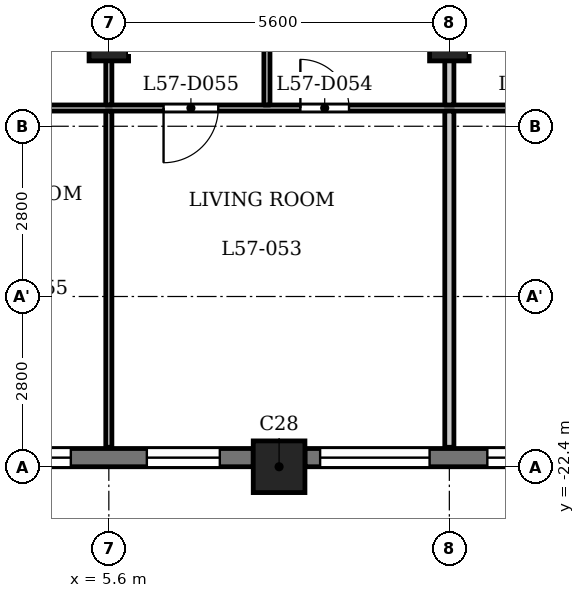
"""IFC4 building model, lengths in metres.
Left out: names, types, materials, properties, quantities, classifications, styles, units other than length and angle.
Written with IfcOpenShell. Run it as: python <this file> out.ifc"""

import sys

from ifc_helpers import new_model, si_unit, direction, frame, frame_2d, origin, origin_2d, place, context, subcontext, project, spatial, rectangle, extrude, element, fill, save


model = new_model("IFC4")
c1 = context("Model", 3, precision=1e-05, world=origin(), true_north=direction((0.0, 1.0)))
c2 = subcontext(c1, "Body", "Model", "MODEL_VIEW")
j1 = project(units=[si_unit("LENGTHUNIT", "METRE"), si_unit("PLANEANGLEUNIT", "RADIAN")], contexts=[c1])
p1 = place(None, origin())
s1 = spatial("IfcSite", under=j1, at=p1, CompositionType="ELEMENT")
p2 = place(p1, origin())
s2 = spatial("IfcBuilding", under=s1, at=p2, CompositionType="ELEMENT")
p3 = place(p2, frame((0.0, 0.0, 220.4)))
s3 = spatial("IfcBuildingStorey", under=s2, at=p3, CompositionType="ELEMENT", Elevation=220.4)
p4 = place(p3, frame((8.4, -22.4, 0.0), z_axis=(0.0, 0.0, 1.0), x_axis=(1.0, 0.0, 0.0)))
e1 = element("IfcColumn", 1, at=p4, inside=s3, PredefinedType="COLUMN", context=c2, shape_type="SweptSolid", body=[
    extrude(rectangle(XDim=0.85, YDim=0.85, at=origin_2d()), origin(), (0.0, 0.0, 1.0), 3.5),
])
for number, where, z_axis, x_axis in (
    (2, (5.6, -15.4, 0.0), (0.0, 0.0, 1.0), (1.0, 0.0, 0.0)),
    (3, (11.2, -15.4, 0.0), (0.0, 0.0, 1.0), (1.0, 0.0, 0.0)),
):
    element("IfcColumn", number, at=place(p3, frame(where, z_axis=z_axis, x_axis=x_axis)), inside=s3, PredefinedType="COLUMN", context=c2, shape_type="SweptSolid", body=[
        extrude(rectangle(XDim=0.65, YDim=0.65, at=origin_2d()), origin(), (0.0, 0.0, 1.0), 3.5),
    ])
p5 = place(p3, frame((3.225, -22.25, 0.0), z_axis=(0.0, 0.0, 1.0), x_axis=(1.0, 0.0, 0.0)))
e4 = element("IfcWall", 4, at=p5, inside=s3, PredefinedType="SOLIDWALL", context=c2, shape_type="SweptSolid", body=[
    extrude(rectangle(XDim=4.75, YDim=0.3, at=frame_2d((2.375, 0.0))), origin(), (0.0, 0.0, 1.0), 2.5),
])
p6 = place(p5, frame((0.55, 0.0, 0.6)))
e5 = element("IfcOpeningElement", 5, at=p6, cuts=e4, PredefinedType="OPENING", context=c2, shape_type="SweptSolid", body=[
    extrude(rectangle(XDim=1.2, YDim=1.55, at=frame_2d((0.6, 0.775))), frame((0.0, 0.16, 0.0), z_axis=(0.0, -1.0, 0.0), x_axis=(1.0, 0.0, 0.0)), (0.0, 0.0, 1.0), 0.32),
])
p7 = place(p5, frame((3.0, 0.0, 0.6)))
e6 = element("IfcOpeningElement", 6, at=p7, cuts=e4, PredefinedType="OPENING", context=c2, shape_type="SweptSolid", body=[
    extrude(rectangle(XDim=1.2, YDim=1.55, at=frame_2d((0.6, 0.775))), frame((0.0, 0.16, 0.0), z_axis=(0.0, -1.0, 0.0), x_axis=(1.0, 0.0, 0.0)), (0.0, 0.0, 1.0), 0.32),
])
p8 = place(p3, frame((8.825, -22.25, 0.0), z_axis=(0.0, 0.0, 1.0), x_axis=(1.0, 0.0, 0.0)))
e7 = element("IfcWall", 7, at=p8, inside=s3, PredefinedType="SOLIDWALL", context=c2, shape_type="SweptSolid", body=[
    extrude(rectangle(XDim=4.75, YDim=0.3, at=frame_2d((2.375, 0.0))), origin(), (0.0, 0.0, 1.0), 2.5),
])
p9 = place(p8, frame((0.25, 0.0, 0.9)))
e8 = element("IfcOpeningElement", 8, at=p9, cuts=e7, PredefinedType="OPENING", context=c2, shape_type="SweptSolid", body=[
    extrude(rectangle(XDim=1.8, YDim=1.25, at=frame_2d((0.9, 0.625))), frame((0.0, 0.16, 0.0), z_axis=(0.0, -1.0, 0.0), x_axis=(1.0, 0.0, 0.0)), (0.0, 0.0, 1.0), 0.32),
])
p10 = place(p8, frame((3.0, 0.0, 0.6)))
e9 = element("IfcOpeningElement", 9, at=p10, cuts=e7, PredefinedType="OPENING", context=c2, shape_type="SweptSolid", body=[
    extrude(rectangle(XDim=1.2, YDim=1.55, at=frame_2d((0.6, 0.775))), frame((0.0, 0.16, 0.0), z_axis=(0.0, -1.0, 0.0), x_axis=(1.0, 0.0, 0.0)), (0.0, 0.0, 1.0), 0.32),
])
p11 = place(p3, frame((-16.725, -16.5, 0.0), z_axis=(0.0, 0.0, 1.0), x_axis=(1.0, 0.0, 0.0)))
e10 = element("IfcWall", 10, at=p11, inside=s3, PredefinedType="PARTITIONING", context=c2, shape_type="SweptSolid", body=[
    extrude(rectangle(XDim=33.45, YDim=0.1, at=frame_2d((16.725, 0.0))), origin(), (0.0, 0.0, 1.0), 3.2),
])
p12 = place(p11, frame((0.675, 0.0, 0.0)))
e11 = element("IfcOpeningElement", 11, at=p12, cuts=e10, PredefinedType="OPENING", context=c2, shape_type="SweptSolid", body=[
    extrude(rectangle(XDim=0.8, YDim=2.1, at=frame_2d((0.4, 1.05))), frame((0.0, 0.06, 0.0), z_axis=(0.0, -1.0, 0.0), x_axis=(1.0, 0.0, 0.0)), (0.0, 0.0, 1.0), 0.12),
])
p13 = place(p11, frame((2.775, 0.0, 0.0)))
e12 = element("IfcOpeningElement", 12, at=p13, cuts=e10, PredefinedType="OPENING", context=c2, shape_type="SweptSolid", body=[
    extrude(rectangle(XDim=0.9, YDim=2.1, at=frame_2d((0.45, 1.05))), frame((0.0, 0.06, 0.0), z_axis=(0.0, -1.0, 0.0), x_axis=(1.0, 0.0, 0.0)), (0.0, 0.0, 1.0), 0.12),
])
p14 = place(p11, frame((6.425, 0.0, 0.0)))
e13 = element("IfcOpeningElement", 13, at=p14, cuts=e10, PredefinedType="OPENING", context=c2, shape_type="SweptSolid", body=[
    extrude(rectangle(XDim=0.8, YDim=2.1, at=frame_2d((0.4, 1.05))), frame((0.0, 0.06, 0.0), z_axis=(0.0, -1.0, 0.0), x_axis=(1.0, 0.0, 0.0)), (0.0, 0.0, 1.0), 0.12),
])
p15 = place(p11, frame((8.775, 0.0, 0.0)))
e14 = element("IfcOpeningElement", 14, at=p15, cuts=e10, PredefinedType="OPENING", context=c2, shape_type="SweptSolid", body=[
    extrude(rectangle(XDim=0.9, YDim=2.1, at=frame_2d((0.45, 1.05))), frame((0.0, 0.06, 0.0), z_axis=(0.0, -1.0, 0.0), x_axis=(1.0, 0.0, 0.0)), (0.0, 0.0, 1.0), 0.12),
])
p16 = place(p11, frame((12.525, 0.0, 0.0)))
e15 = element("IfcOpeningElement", 15, at=p16, cuts=e10, PredefinedType="OPENING", context=c2, shape_type="SweptSolid", body=[
    extrude(rectangle(XDim=0.9, YDim=2.1, at=frame_2d((0.45, 1.05))), frame((0.0, 0.06, 0.0), z_axis=(0.0, -1.0, 0.0), x_axis=(1.0, 0.0, 0.0)), (0.0, 0.0, 1.0), 0.12),
])
p17 = place(p11, frame((14.775, 0.0, 0.0)))
e16 = element("IfcOpeningElement", 16, at=p17, cuts=e10, PredefinedType="OPENING", context=c2, shape_type="SweptSolid", body=[
    extrude(rectangle(XDim=0.9, YDim=2.1, at=frame_2d((0.45, 1.05))), frame((0.0, 0.06, 0.0), z_axis=(0.0, -1.0, 0.0), x_axis=(1.0, 0.0, 0.0)), (0.0, 0.0, 1.0), 0.12),
])
p18 = place(p11, frame((25.475, 0.0, 0.0)))
e17 = element("IfcOpeningElement", 17, at=p18, cuts=e10, PredefinedType="OPENING", context=c2, shape_type="SweptSolid", body=[
    extrude(rectangle(XDim=0.8, YDim=2.1, at=frame_2d((0.4, 1.05))), frame((0.0, 0.06, 0.0), z_axis=(0.0, -1.0, 0.0), x_axis=(1.0, 0.0, 0.0)), (0.0, 0.0, 1.0), 0.12),
])
p19 = place(p11, frame((23.225, 0.0, 0.0)))
e18 = element("IfcOpeningElement", 18, at=p19, cuts=e10, PredefinedType="OPENING", context=c2, shape_type="SweptSolid", body=[
    extrude(rectangle(XDim=0.9, YDim=2.1, at=frame_2d((0.45, 1.05))), frame((0.0, 0.06, 0.0), z_axis=(0.0, -1.0, 0.0), x_axis=(1.0, 0.0, 0.0)), (0.0, 0.0, 1.0), 0.12),
])
p20 = place(p11, frame((17.875, 0.0, 0.0)))
e19 = element("IfcOpeningElement", 19, at=p20, cuts=e10, PredefinedType="OPENING", context=c2, shape_type="SweptSolid", body=[
    extrude(rectangle(XDim=0.9, YDim=2.1, at=frame_2d((0.45, 1.05))), frame((0.0, 0.06, 0.0), z_axis=(0.0, -1.0, 0.0), x_axis=(1.0, 0.0, 0.0)), (0.0, 0.0, 1.0), 0.12),
])
p21 = place(p11, frame((19.975, 0.0, 0.0)))
e20 = element("IfcOpeningElement", 20, at=p21, cuts=e10, PredefinedType="OPENING", context=c2, shape_type="SweptSolid", body=[
    extrude(rectangle(XDim=0.9, YDim=2.1, at=frame_2d((0.45, 1.05))), frame((0.0, 0.06, 0.0), z_axis=(0.0, -1.0, 0.0), x_axis=(1.0, 0.0, 0.0)), (0.0, 0.0, 1.0), 0.12),
])
p22 = place(p11, frame((30.825, 0.0, 0.0)))
e21 = element("IfcOpeningElement", 21, at=p22, cuts=e10, PredefinedType="OPENING", context=c2, shape_type="SweptSolid", body=[
    extrude(rectangle(XDim=0.8, YDim=2.1, at=frame_2d((0.4, 1.05))), frame((0.0, 0.06, 0.0), z_axis=(0.0, -1.0, 0.0), x_axis=(1.0, 0.0, 0.0)), (0.0, 0.0, 1.0), 0.12),
])
p23 = place(p11, frame((29.075, 0.0, 0.0)))
e22 = element("IfcOpeningElement", 22, at=p23, cuts=e10, PredefinedType="OPENING", context=c2, shape_type="SweptSolid", body=[
    extrude(rectangle(XDim=0.9, YDim=2.1, at=frame_2d((0.45, 1.05))), frame((0.0, 0.06, 0.0), z_axis=(0.0, -1.0, 0.0), x_axis=(1.0, 0.0, 0.0)), (0.0, 0.0, 1.0), 0.12),
])
p24 = place(p3, frame((5.6, -22.08, 0.0), z_axis=(0.0, 0.0, 1.0), x_axis=(0.0, 1.0, 0.0)))
e23 = element("IfcWall", 23, at=p24, inside=s3, PredefinedType="PARTITIONING", context=c2, shape_type="SweptSolid", body=[
    extrude(rectangle(XDim=5.53, YDim=0.1, at=frame_2d((2.765, 0.0))), origin(), (0.0, 0.0, 1.0), 3.2),
])
p25 = place(p3, frame((5.6, -16.45, 0.0), z_axis=(0.0, 0.0, 1.0), x_axis=(0.0, 1.0, 0.0)))
e24 = element("IfcWall", 24, at=p25, inside=s3, PredefinedType="PARTITIONING", context=c2, shape_type="SweptSolid", body=[
    extrude(rectangle(XDim=3.175, YDim=0.1, at=frame_2d((1.587, 0.0))), origin(), (0.0, 0.0, 1.0), 3.2),
])
p26 = place(p25, frame((1.6, 0.0, 0.0)))
e25 = element("IfcOpeningElement", 25, at=p26, cuts=e24, PredefinedType="OPENING", context=c2, shape_type="SweptSolid", body=[
    extrude(rectangle(XDim=0.9, YDim=2.1, at=frame_2d((0.45, 1.05))), frame((0.0, 0.06, 0.0), z_axis=(0.0, -1.0, 0.0), x_axis=(1.0, 0.0, 0.0)), (0.0, 0.0, 1.0), 0.12),
])
p27 = place(p3, frame((8.2, -16.45, 0.0), z_axis=(0.0, 0.0, 1.0), x_axis=(0.0, 1.0, 0.0)))
e26 = element("IfcWall", 26, at=p27, inside=s3, PredefinedType="PARTITIONING", context=c2, shape_type="SweptSolid", body=[
    extrude(rectangle(XDim=3.175, YDim=0.1, at=frame_2d((1.587, 0.0))), origin(), (0.0, 0.0, 1.0), 3.2),
])
p28 = place(p3, frame((11.2, -22.08, 0.0), z_axis=(0.0, 0.0, 1.0), x_axis=(0.0, 1.0, 0.0)))
e27 = element("IfcWall", 27, at=p28, inside=s3, PredefinedType="PARTITIONING", context=c2, shape_type="SweptSolid", body=[
    extrude(rectangle(XDim=5.53, YDim=0.15, at=frame_2d((2.765, 0.0))), origin(), (0.0, 0.0, 1.0), 3.2),
])
p29 = place(p3, frame((11.2, -16.45, 0.0), z_axis=(0.0, 0.0, 1.0), x_axis=(0.0, 1.0, 0.0)))
e28 = element("IfcWall", 28, at=p29, inside=s3, PredefinedType="PARTITIONING", context=c2, shape_type="SweptSolid", body=[
    extrude(rectangle(XDim=3.175, YDim=0.15, at=frame_2d((1.587, 0.0))), origin(), (0.0, 0.0, 1.0), 3.2),
])
p30 = place(p18, origin())
e29 = element("IfcDoor", 29, at=p30, inside=s3, OperationType="SINGLE_SWING_RIGHT", PredefinedType="DOOR", context=c2, shape_type="SweptSolid", body=[
    extrude(rectangle(XDim=0.8, YDim=2.1, at=frame_2d((0.4, 1.05))), frame((0.0, 0.025, 0.0), z_axis=(0.0, -1.0, 0.0), x_axis=(1.0, 0.0, 0.0)), (0.0, 0.0, 1.0), 0.05),
])
fill(e17, e29)
p31 = place(p19, origin())
e30 = element("IfcDoor", 30, at=p31, inside=s3, OperationType="SINGLE_SWING_LEFT", PredefinedType="DOOR", context=c2, shape_type="SweptSolid", body=[
    extrude(rectangle(XDim=0.9, YDim=2.1, at=frame_2d((0.45, 1.05))), frame((0.0, 0.025, 0.0), z_axis=(0.0, -1.0, 0.0), x_axis=(1.0, 0.0, 0.0)), (0.0, 0.0, 1.0), 0.05),
])
fill(e18, e30)
p32 = place(p6, origin())
e31 = element("IfcWindow", 31, at=p32, inside=s3, PartitioningType="SINGLE_PANEL", PredefinedType="WINDOW", context=c2, shape_type="SweptSolid", body=[
    extrude(rectangle(XDim=1.2, YDim=1.55, at=frame_2d((0.6, 0.775))), frame((0.0, 0.03, 0.0), z_axis=(0.0, -1.0, 0.0), x_axis=(1.0, 0.0, 0.0)), (0.0, 0.0, 1.0), 0.06),
])
fill(e5, e31)
p33 = place(p7, origin())
e32 = element("IfcWindow", 32, at=p33, inside=s3, PartitioningType="SINGLE_PANEL", PredefinedType="WINDOW", context=c2, shape_type="SweptSolid", body=[
    extrude(rectangle(XDim=1.2, YDim=1.55, at=frame_2d((0.6, 0.775))), frame((0.0, 0.03, 0.0), z_axis=(0.0, -1.0, 0.0), x_axis=(1.0, 0.0, 0.0)), (0.0, 0.0, 1.0), 0.06),
])
fill(e6, e32)
p34 = place(p9, origin())
e33 = element("IfcWindow", 33, at=p34, inside=s3, PartitioningType="SINGLE_PANEL", PredefinedType="WINDOW", context=c2, shape_type="SweptSolid", body=[
    extrude(rectangle(XDim=1.8, YDim=1.25, at=frame_2d((0.9, 0.625))), frame((0.0, 0.03, 0.0), z_axis=(0.0, -1.0, 0.0), x_axis=(1.0, 0.0, 0.0)), (0.0, 0.0, 1.0), 0.06),
])
fill(e8, e33)
p35 = place(p10, origin())
e34 = element("IfcWindow", 34, at=p35, inside=s3, PartitioningType="SINGLE_PANEL", PredefinedType="WINDOW", context=c2, shape_type="SweptSolid", body=[
    extrude(rectangle(XDim=1.2, YDim=1.55, at=frame_2d((0.6, 0.775))), frame((0.0, 0.03, 0.0), z_axis=(0.0, -1.0, 0.0), x_axis=(1.0, 0.0, 0.0)), (0.0, 0.0, 1.0), 0.06),
])
fill(e9, e34)
save(model, sys.argv[1])
